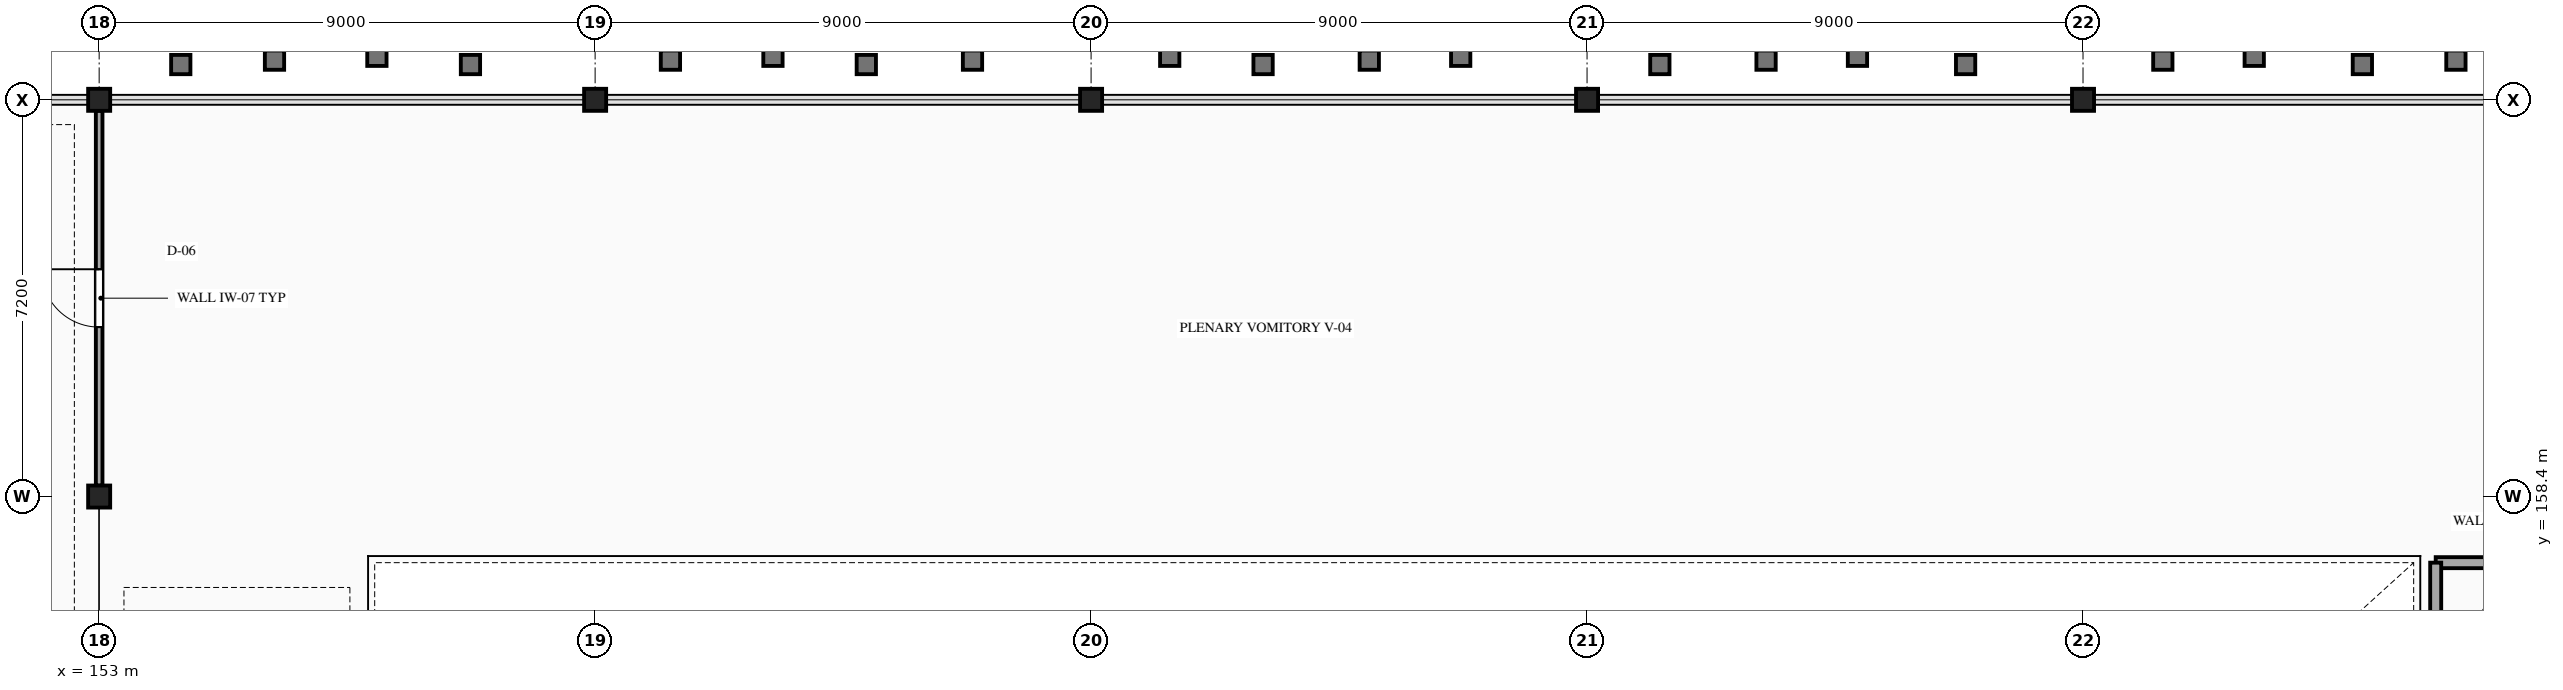
"""IFC4 building model, lengths in metres.
Left out: names, types, materials, properties, quantities, classifications, styles, units other than length and angle.
Written with IfcOpenShell. Run it as: python <this file> out.ifc"""

import sys

from ifc_helpers import new_model, si_unit, direction, frame, frame_2d, origin, origin_2d, place, context, subcontext, project, spatial, rectangle, hollow_rectangle, extrude, element, fill, save


model = new_model("IFC4")
c1 = context("Model", 3, precision=1e-05, world=origin(), true_north=direction((0.0, 1.0)))
c2 = subcontext(c1, "Body", "Model", "MODEL_VIEW")
j1 = project(units=[si_unit("LENGTHUNIT", "METRE"), si_unit("PLANEANGLEUNIT", "RADIAN")], contexts=[c1])
p1 = place(None, origin())
s1 = spatial("IfcSite", under=j1, at=p1, CompositionType="ELEMENT")
p2 = place(p1, origin())
s2 = spatial("IfcBuilding", under=s1, at=p2, CompositionType="ELEMENT")
p3 = place(p2, frame((0.0, 0.0, 10.8)))
s3 = spatial("IfcBuildingStorey", under=s2, at=p3, CompositionType="ELEMENT", Elevation=10.8)
for number, where, z_axis, x_axis in (
    (1, (153.0, 158.4, 0.0), (0.0, 0.0, 1.0), (1.0, 0.0, 0.0)),
    (2, (153.0, 165.6, 0.0), (0.0, 0.0, 1.0), (1.0, 0.0, 0.0)),
    (3, (162.0, 165.6, 0.0), (0.0, 0.0, 1.0), (1.0, 0.0, 0.0)),
    (4, (171.0, 165.6, 0.0), (0.0, 0.0, 1.0), (1.0, 0.0, 0.0)),
    (5, (180.0, 165.6, 0.0), (0.0, 0.0, 1.0), (1.0, 0.0, 0.0)),
    (6, (189.0, 165.6, 0.0), (0.0, 0.0, 1.0), (1.0, 0.0, 0.0)),
):
    element("IfcColumn", number, at=place(p3, frame(where, z_axis=z_axis, x_axis=x_axis)), inside=s3, PredefinedType="COLUMN", context=c2, shape_type="SweptSolid", body=[
        extrude(hollow_rectangle(XDim=0.4, YDim=0.4, WallThickness=0.016, at=origin_2d()), origin(), (0.0, 0.0, 1.0), 4.5),
    ])
p4 = place(p3, frame((195.4, 157.2, 0.0), z_axis=(0.0, 0.0, 1.0), x_axis=(1.0, 0.0, 0.0)))
e7 = element("IfcWall", 7, at=p4, inside=s3, PredefinedType="PARTITIONING", context=c2, shape_type="SweptSolid", body=[
    extrude(rectangle(XDim=2.6, YDim=0.2, at=frame_2d((1.3, 0.0))), origin(), (0.0, 0.0, 1.0), 4.22),
])
p5 = place(p3, frame((153.0, 158.598, 0.0), z_axis=(0.0, 0.0, 1.0), x_axis=(0.0, 1.0, 0.0)))
e8 = element("IfcWall", 8, at=p5, inside=s3, PredefinedType="PARTITIONING", context=c2, shape_type="SweptSolid", body=[
    extrude(rectangle(XDim=6.804, YDim=0.12, at=frame_2d((3.402, 0.0))), origin(), (0.0, 0.0, 1.0), 3.894),
])
p6 = place(p5, frame((2.877, 0.0, 0.0)))
e9 = element("IfcOpeningElement", 9, at=p6, cuts=e8, PredefinedType="OPENING", context=c2, shape_type="SweptSolid", body=[
    extrude(rectangle(XDim=1.05, YDim=2.15, at=frame_2d((0.525, 1.075))), frame((0.0, 0.07, 0.0), z_axis=(0.0, -1.0, 0.0), x_axis=(1.0, 0.0, 0.0)), (0.0, 0.0, 1.0), 0.14),
])
p7 = place(p3, frame((195.4, 151.2, 0.0), z_axis=(0.0, 0.0, 1.0), x_axis=(0.0, 1.0, 0.0)))
e10 = element("IfcWall", 10, at=p7, inside=s3, PredefinedType="PARTITIONING", context=c2, shape_type="SweptSolid", body=[
    extrude(rectangle(XDim=6.0, YDim=0.2, at=frame_2d((3.0, 0.0))), origin(), (0.0, 0.0, 1.0), 4.22),
])
p8 = place(p6, origin())
e11 = element("IfcDoor", 11, at=p8, inside=s3, OperationType="SINGLE_SWING_RIGHT", PredefinedType="DOOR", context=c2, shape_type="SweptSolid", body=[
    extrude(rectangle(XDim=1.05, YDim=2.15, at=frame_2d((0.525, 1.075))), frame((0.0, 0.025, 0.0), z_axis=(0.0, -1.0, 0.0), x_axis=(1.0, 0.0, 0.0)), (0.0, 0.0, 1.0), 0.05),
])
fill(e9, e11)
save(model, sys.argv[1])
